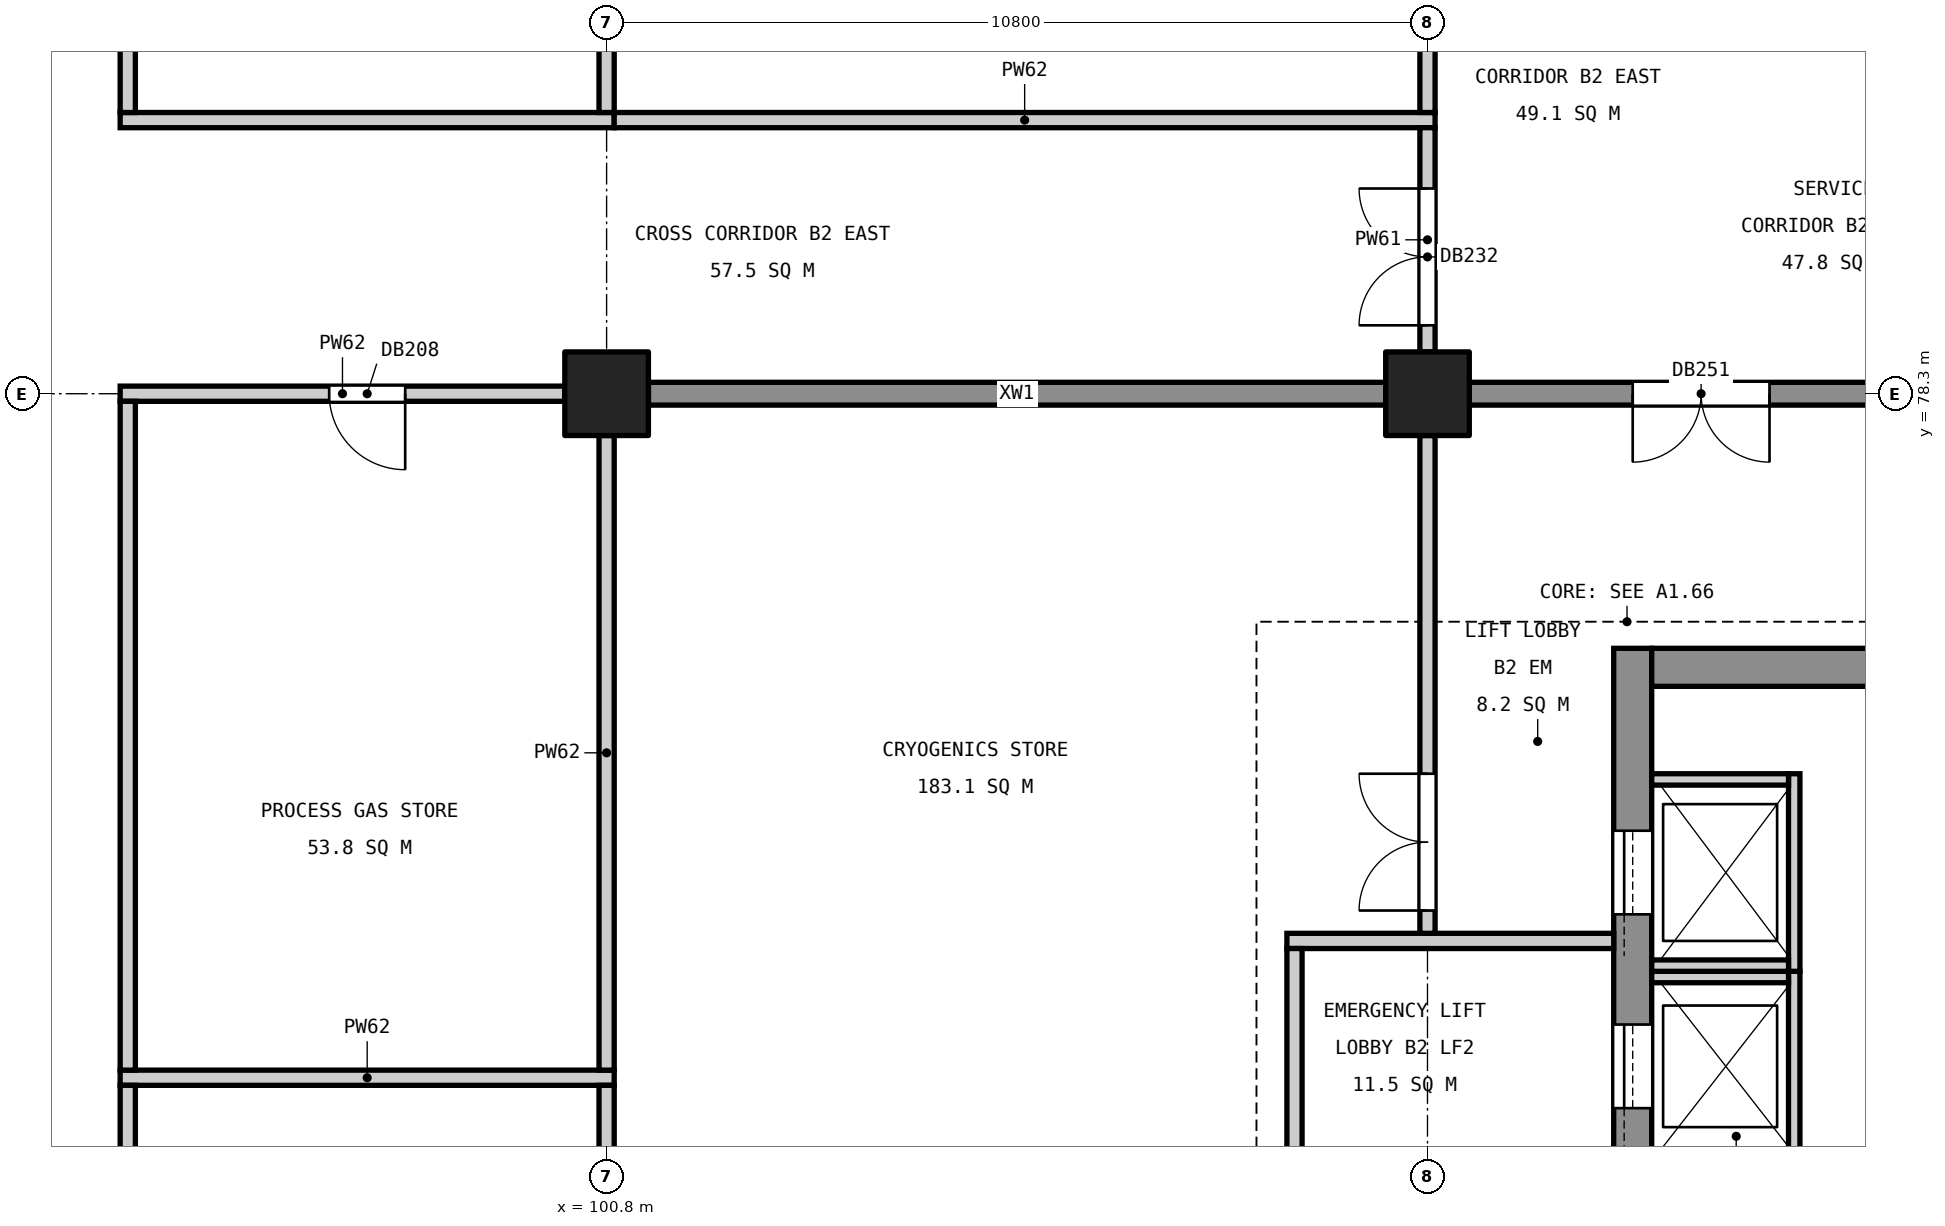
"""IFC4 building model, lengths in metres.
Left out: names, types, materials, properties, quantities, classifications, styles, units other than length and angle.
Written with IfcOpenShell. Run it as: python <this file> out.ifc"""

import sys

from ifc_helpers import new_model, si_unit, direction, frame, frame_2d, origin, origin_2d, place, context, subcontext, project, spatial, rectangle, extrude, element, fill, save


model = new_model("IFC4")
c1 = context("Model", 3, precision=1e-05, world=origin(), true_north=direction((0.0, 1.0)))
c2 = subcontext(c1, "Body", "Model", "MODEL_VIEW")
j1 = project(units=[si_unit("LENGTHUNIT", "METRE"), si_unit("PLANEANGLEUNIT", "RADIAN")], contexts=[c1])
p1 = place(None, origin())
s1 = spatial("IfcSite", under=j1, at=p1, CompositionType="ELEMENT")
p2 = place(p1, origin())
s2 = spatial("IfcBuilding", under=s1, at=p2, CompositionType="ELEMENT")
p3 = place(p2, frame((0.0, 0.0, -9.6)))
s3 = spatial("IfcBuildingStorey", under=s2, at=p3, CompositionType="ELEMENT", Elevation=-9.6)
for number, where, z_axis, x_axis in (
    (1, (111.6, 78.3, 0.0), (0.0, 0.0, 1.0), (1.0, 0.0, 0.0)),
    (2, (100.8, 78.3, 0.0), (0.0, 0.0, 1.0), (1.0, 0.0, 0.0)),
):
    element("IfcColumn", number, at=place(p3, frame(where, z_axis=z_axis, x_axis=x_axis)), inside=s3, PredefinedType="COLUMN", context=c2, shape_type="SweptSolid", body=[
        extrude(rectangle(XDim=1.1, YDim=1.1, at=origin_2d()), origin(), (0.0, 0.0, 1.0), 4.35),
    ])
p4 = place(p3, frame((114.3, 60.05, 0.0), z_axis=(0.0, 0.0, 1.0), x_axis=(0.0, 1.0, 0.0)))
e3 = element("IfcWall", 3, at=p4, inside=s3, PredefinedType="SHEAR", context=c2, shape_type="SweptSolid", body=[
    extrude(rectangle(XDim=14.9, YDim=0.5, at=frame_2d((7.45, 0.0))), origin(), (0.0, 0.0, 1.0), 4.35),
])
p5 = place(p4, frame((8.85, 0.0, 0.0)))
e4 = element("IfcOpeningElement", 4, at=p5, cuts=e3, PredefinedType="OPENING", context=c2, shape_type="SweptSolid", body=[
    extrude(rectangle(XDim=1.1, YDim=2.1, at=frame_2d((0.55, 1.05))), frame((0.0, 0.26, 0.0), z_axis=(0.0, -1.0, 0.0), x_axis=(1.0, 0.0, 0.0)), (0.0, 0.0, 1.0), 0.52),
])
p6 = place(p4, frame((11.4, 0.0, 0.0)))
e5 = element("IfcOpeningElement", 5, at=p6, cuts=e3, PredefinedType="OPENING", context=c2, shape_type="SweptSolid", body=[
    extrude(rectangle(XDim=1.1, YDim=2.1, at=frame_2d((0.55, 1.05))), frame((0.0, 0.26, 0.0), z_axis=(0.0, -1.0, 0.0), x_axis=(1.0, 0.0, 0.0)), (0.0, 0.0, 1.0), 0.52),
])
p7 = place(p4, frame((3.75, 0.0, 0.0)))
e6 = element("IfcOpeningElement", 6, at=p7, cuts=e3, PredefinedType="OPENING", context=c2, shape_type="SweptSolid", body=[
    extrude(rectangle(XDim=1.0, YDim=2.1, at=frame_2d((0.5, 1.05))), frame((0.0, 0.26, 0.0), z_axis=(0.0, -1.0, 0.0), x_axis=(1.0, 0.0, 0.0)), (0.0, 0.0, 1.0), 0.52),
])
p8 = place(p3, frame((118.55, 74.7, 0.0), z_axis=(0.0, 0.0, 1.0), x_axis=(-1.0, 0.0, 0.0)))
e7 = element("IfcWall", 7, at=p8, inside=s3, PredefinedType="SHEAR", context=c2, shape_type="SweptSolid", body=[
    extrude(rectangle(XDim=4.0, YDim=0.5, at=frame_2d((2.0, 0.0))), origin(), (0.0, 0.0, 1.0), 4.35),
])
p9 = place(p3, frame((118.25, 78.3, 0.0), z_axis=(0.0, 0.0, 1.0), x_axis=(-1.0, 0.0, 0.0)))
e8 = element("IfcWall", 8, at=p9, inside=s3, PredefinedType="SHEAR", context=c2, shape_type="SweptSolid", body=[
    extrude(rectangle(XDim=6.1, YDim=0.3, at=frame_2d((3.05, 0.0))), origin(), (0.0, 0.0, 1.0), 4.35),
])
p10 = place(p9, frame((2.15, 0.0, 0.0)))
e9 = element("IfcOpeningElement", 9, at=p10, cuts=e8, PredefinedType="OPENING", context=c2, shape_type="SweptSolid", body=[
    extrude(rectangle(XDim=1.8, YDim=2.1, at=frame_2d((0.9, 1.05))), frame((0.0, 0.16, 0.0), z_axis=(0.0, -1.0, 0.0), x_axis=(1.0, 0.0, 0.0)), (0.0, 0.0, 1.0), 0.32),
])
p11 = place(p3, frame((111.05, 78.3, 0.0), z_axis=(0.0, 0.0, 1.0), x_axis=(-1.0, 0.0, 0.0)))
e10 = element("IfcWall", 10, at=p11, inside=s3, PredefinedType="SHEAR", context=c2, shape_type="SweptSolid", body=[
    extrude(rectangle(XDim=9.7, YDim=0.3, at=frame_2d((4.85, 0.0))), origin(), (0.0, 0.0, 1.0), 4.35),
])
p12 = place(p3, frame((116.425, 68.2, 0.0), z_axis=(0.0, 0.0, 1.0), x_axis=(0.0, 1.0, 0.0)))
e11 = element("IfcWall", 11, at=p12, inside=s3, PredefinedType="SOLIDWALL", context=c2, shape_type="SweptSolid", body=[
    extrude(rectangle(XDim=2.5, YDim=0.15, at=frame_2d((1.25, 0.0))), origin(), (0.0, 0.0, 1.0), 4.8),
])
p13 = place(p3, frame((116.35, 70.625, 0.0), z_axis=(0.0, 0.0, 1.0), x_axis=(-1.0, 0.0, 0.0)))
e12 = element("IfcWall", 12, at=p13, inside=s3, PredefinedType="SOLIDWALL", context=c2, shape_type="SweptSolid", body=[
    extrude(rectangle(XDim=1.8, YDim=0.15, at=frame_2d((0.9, 0.0))), origin(), (0.0, 0.0, 1.0), 4.8),
])
p14 = place(p3, frame((116.425, 70.7, 0.0), z_axis=(0.0, 0.0, 1.0), x_axis=(0.0, 1.0, 0.0)))
e13 = element("IfcWall", 13, at=p14, inside=s3, PredefinedType="SOLIDWALL", context=c2, shape_type="SweptSolid", body=[
    extrude(rectangle(XDim=2.6, YDim=0.15, at=frame_2d((1.3, 0.0))), origin(), (0.0, 0.0, 1.0), 4.8),
])
for number, where, z_axis, x_axis in (
    (14, (116.35, 70.775, 0.0), (0.0, 0.0, 1.0), (-1.0, 0.0, 0.0)),
    (15, (116.35, 73.225, 0.0), (0.0, 0.0, 1.0), (-1.0, 0.0, 0.0)),
):
    element("IfcWall", number, at=place(p3, frame(where, z_axis=z_axis, x_axis=x_axis)), inside=s3, PredefinedType="SOLIDWALL", context=c2, shape_type="SweptSolid", body=[
        extrude(rectangle(XDim=1.8, YDim=0.15, at=frame_2d((0.9, 0.0))), origin(), (0.0, 0.0, 1.0), 4.8),
    ])
p15 = place(p3, frame((94.4, 69.3, 0.0), z_axis=(0.0, 0.0, 1.0), x_axis=(1.0, 0.0, 0.0)))
e16 = element("IfcWall", 16, at=p15, inside=s3, PredefinedType="PARTITIONING", context=c2, shape_type="SweptSolid", body=[
    extrude(rectangle(XDim=6.5, YDim=0.2, at=frame_2d((3.25, 0.0))), origin(), (0.0, 0.0, 1.0), 4.35),
])
p16 = place(p3, frame((109.75, 71.1, 0.0), z_axis=(0.0, 0.0, 1.0), x_axis=(1.0, 0.0, 0.0)))
e17 = element("IfcWall", 17, at=p16, inside=s3, PredefinedType="PARTITIONING", context=c2, shape_type="SweptSolid", body=[
    extrude(rectangle(XDim=4.3, YDim=0.2, at=frame_2d((2.15, 0.0))), origin(), (0.0, 0.0, 1.0), 4.35),
])
p17 = place(p3, frame((94.4, 78.3, 0.0), z_axis=(0.0, 0.0, 1.0), x_axis=(1.0, 0.0, 0.0)))
e18 = element("IfcWall", 18, at=p17, inside=s3, PredefinedType="PARTITIONING", context=c2, shape_type="SweptSolid", body=[
    extrude(rectangle(XDim=5.85, YDim=0.2, at=frame_2d((2.925, 0.0))), origin(), (0.0, 0.0, 1.0), 4.35),
])
p18 = place(p17, frame((2.75, 0.0, 0.0)))
e19 = element("IfcOpeningElement", 19, at=p18, cuts=e18, PredefinedType="OPENING", context=c2, shape_type="SweptSolid", body=[
    extrude(rectangle(XDim=1.0, YDim=2.1, at=frame_2d((0.5, 1.05))), frame((0.0, 0.11, 0.0), z_axis=(0.0, -1.0, 0.0), x_axis=(1.0, 0.0, 0.0)), (0.0, 0.0, 1.0), 0.22),
])
p19 = place(p3, frame((94.4, 81.9, 0.0), z_axis=(0.0, 0.0, 1.0), x_axis=(1.0, 0.0, 0.0)))
e20 = element("IfcWall", 20, at=p19, inside=s3, PredefinedType="PARTITIONING", context=c2, shape_type="SweptSolid", body=[
    extrude(rectangle(XDim=6.5, YDim=0.2, at=frame_2d((3.25, 0.0))), origin(), (0.0, 0.0, 1.0), 4.35),
])
p20 = place(p3, frame((100.9, 81.9, 0.0), z_axis=(0.0, 0.0, 1.0), x_axis=(1.0, 0.0, 0.0)))
e21 = element("IfcWall", 21, at=p20, inside=s3, PredefinedType="PARTITIONING", context=c2, shape_type="SweptSolid", body=[
    extrude(rectangle(XDim=10.8, YDim=0.2, at=frame_2d((5.4, 0.0))), origin(), (0.0, 0.0, 1.0), 4.35),
])
for number, where, z_axis, x_axis in (
    (22, (94.5, 60.4, 0.0), (0.0, 0.0, 1.0), (0.0, 1.0, 0.0)),
    (23, (94.5, 69.4, 0.0), (0.0, 0.0, 1.0), (0.0, 1.0, 0.0)),
):
    element("IfcWall", number, at=place(p3, frame(where, z_axis=z_axis, x_axis=x_axis)), inside=s3, PredefinedType="PARTITIONING", context=c2, shape_type="SweptSolid", body=[
        extrude(rectangle(XDim=8.8, YDim=0.2, at=frame_2d((4.4, 0.0))), origin(), (0.0, 0.0, 1.0), 4.35),
    ])
p21 = place(p3, frame((94.5, 82.0, 0.0), z_axis=(0.0, 0.0, 1.0), x_axis=(0.0, 1.0, 0.0)))
e24 = element("IfcWall", 24, at=p21, inside=s3, PredefinedType="PARTITIONING", context=c2, shape_type="SweptSolid", body=[
    extrude(rectangle(XDim=17.8, YDim=0.2, at=frame_2d((8.9, 0.0))), origin(), (0.0, 0.0, 1.0), 4.35),
])
p22 = place(p3, frame((100.8, 68.05, 0.0), z_axis=(0.0, 0.0, 1.0), x_axis=(0.0, 1.0, 0.0)))
e25 = element("IfcWall", 25, at=p22, inside=s3, PredefinedType="PARTITIONING", context=c2, shape_type="SweptSolid", body=[
    extrude(rectangle(XDim=1.15, YDim=0.2, at=frame_2d((0.575, 0.0))), origin(), (0.0, 0.0, 1.0), 4.35),
])
p23 = place(p3, frame((100.8, 69.4, 0.0), z_axis=(0.0, 0.0, 1.0), x_axis=(0.0, 1.0, 0.0)))
e26 = element("IfcWall", 26, at=p23, inside=s3, PredefinedType="PARTITIONING", context=c2, shape_type="SweptSolid", body=[
    extrude(rectangle(XDim=8.35, YDim=0.2, at=frame_2d((4.175, 0.0))), origin(), (0.0, 0.0, 1.0), 4.35),
])
p24 = place(p3, frame((100.8, 82.0, 0.0), z_axis=(0.0, 0.0, 1.0), x_axis=(0.0, 1.0, 0.0)))
e27 = element("IfcWall", 27, at=p24, inside=s3, PredefinedType="PARTITIONING", context=c2, shape_type="SweptSolid", body=[
    extrude(rectangle(XDim=6.55, YDim=0.2, at=frame_2d((3.275, 0.0))), origin(), (0.0, 0.0, 1.0), 4.35),
])
p25 = place(p3, frame((109.85, 68.225, 0.0), z_axis=(0.0, 0.0, 1.0), x_axis=(0.0, 1.0, 0.0)))
e28 = element("IfcWall", 28, at=p25, inside=s3, PredefinedType="PARTITIONING", context=c2, shape_type="SweptSolid", body=[
    extrude(rectangle(XDim=2.775, YDim=0.2, at=frame_2d((1.387, 0.0))), origin(), (0.0, 0.0, 1.0), 4.35),
])
p26 = place(p3, frame((111.6, 71.2, 0.0), z_axis=(0.0, 0.0, 1.0), x_axis=(0.0, 1.0, 0.0)))
e29 = element("IfcWall", 29, at=p26, inside=s3, PredefinedType="PARTITIONING", context=c2, shape_type="SweptSolid", body=[
    extrude(rectangle(XDim=6.55, YDim=0.2, at=frame_2d((3.275, 0.0))), origin(), (0.0, 0.0, 1.0), 4.35),
])
p27 = place(p26, frame((0.3, 0.0, 0.0)))
e30 = element("IfcOpeningElement", 30, at=p27, cuts=e29, PredefinedType="OPENING", context=c2, shape_type="SweptSolid", body=[
    extrude(rectangle(XDim=1.8, YDim=2.1, at=frame_2d((0.9, 1.05))), frame((0.0, 0.11, 0.0), z_axis=(0.0, -1.0, 0.0), x_axis=(1.0, 0.0, 0.0)), (0.0, 0.0, 1.0), 0.22),
])
p28 = place(p3, frame((111.6, 78.85, 0.0), z_axis=(0.0, 0.0, 1.0), x_axis=(0.0, 1.0, 0.0)))
e31 = element("IfcWall", 31, at=p28, inside=s3, PredefinedType="PARTITIONING", context=c2, shape_type="SweptSolid", body=[
    extrude(rectangle(XDim=2.95, YDim=0.2, at=frame_2d((1.475, 0.0))), origin(), (0.0, 0.0, 1.0), 4.35),
])
p29 = place(p28, frame((0.35, 0.0, 0.0)))
e32 = element("IfcOpeningElement", 32, at=p29, cuts=e31, PredefinedType="OPENING", context=c2, shape_type="SweptSolid", body=[
    extrude(rectangle(XDim=1.8, YDim=2.1, at=frame_2d((0.9, 1.05))), frame((0.0, 0.11, 0.0), z_axis=(0.0, -1.0, 0.0), x_axis=(1.0, 0.0, 0.0)), (0.0, 0.0, 1.0), 0.22),
])
p30 = place(p3, frame((111.6, 82.0, 0.0), z_axis=(0.0, 0.0, 1.0), x_axis=(0.0, 1.0, 0.0)))
e33 = element("IfcWall", 33, at=p30, inside=s3, PredefinedType="PARTITIONING", context=c2, shape_type="SweptSolid", body=[
    extrude(rectangle(XDim=6.55, YDim=0.2, at=frame_2d((3.275, 0.0))), origin(), (0.0, 0.0, 1.0), 4.35),
])
p31 = place(p5, origin())
e34 = element("IfcDoor", 34, at=p31, inside=s3, OperationType="SLIDING_TO_LEFT", PredefinedType="DOOR", context=c2, shape_type="SweptSolid", body=[
    extrude(rectangle(XDim=1.1, YDim=2.1, at=frame_2d((0.55, 1.05))), frame((0.0, 0.025, 0.0), z_axis=(0.0, -1.0, 0.0), x_axis=(1.0, 0.0, 0.0)), (0.0, 0.0, 1.0), 0.05),
])
fill(e4, e34)
p32 = place(p6, origin())
e35 = element("IfcDoor", 35, at=p32, inside=s3, OperationType="SLIDING_TO_LEFT", PredefinedType="DOOR", context=c2, shape_type="SweptSolid", body=[
    extrude(rectangle(XDim=1.1, YDim=2.1, at=frame_2d((0.55, 1.05))), frame((0.0, 0.025, 0.0), z_axis=(0.0, -1.0, 0.0), x_axis=(1.0, 0.0, 0.0)), (0.0, 0.0, 1.0), 0.05),
])
fill(e5, e35)
p33 = place(p18, frame((1.0, 0.0, 0.0), z_axis=(0.0, 0.0, 1.0), x_axis=(-1.0, 0.0, 0.0)))
e36 = element("IfcDoor", 36, at=p33, inside=s3, OperationType="SINGLE_SWING_LEFT", PredefinedType="DOOR", context=c2, shape_type="SweptSolid", body=[
    extrude(rectangle(XDim=1.0, YDim=2.1, at=frame_2d((0.5, 1.05))), frame((0.0, 0.025, 0.0), z_axis=(0.0, -1.0, 0.0), x_axis=(1.0, 0.0, 0.0)), (0.0, 0.0, 1.0), 0.05),
])
fill(e19, e36)
p34 = place(p27, origin())
e37 = element("IfcDoor", 37, at=p34, inside=s3, OperationType="DOUBLE_DOOR_SINGLE_SWING", PredefinedType="DOOR", context=c2, shape_type="SweptSolid", body=[
    extrude(rectangle(XDim=1.8, YDim=2.1, at=frame_2d((0.9, 1.05))), frame((0.0, 0.025, 0.0), z_axis=(0.0, -1.0, 0.0), x_axis=(1.0, 0.0, 0.0)), (0.0, 0.0, 1.0), 0.05),
])
fill(e30, e37)
p35 = place(p29, origin())
e38 = element("IfcDoor", 38, at=p35, inside=s3, OperationType="DOUBLE_DOOR_SINGLE_SWING", PredefinedType="DOOR", context=c2, shape_type="SweptSolid", body=[
    extrude(rectangle(XDim=1.8, YDim=2.1, at=frame_2d((0.9, 1.05))), frame((0.0, 0.025, 0.0), z_axis=(0.0, -1.0, 0.0), x_axis=(1.0, 0.0, 0.0)), (0.0, 0.0, 1.0), 0.05),
])
fill(e32, e38)
p36 = place(p10, origin())
e39 = element("IfcDoor", 39, at=p36, inside=s3, OperationType="DOUBLE_DOOR_SINGLE_SWING", PredefinedType="DOOR", context=c2, shape_type="SweptSolid", body=[
    extrude(rectangle(XDim=1.8, YDim=2.1, at=frame_2d((0.9, 1.05))), frame((0.0, 0.025, 0.0), z_axis=(0.0, -1.0, 0.0), x_axis=(1.0, 0.0, 0.0)), (0.0, 0.0, 1.0), 0.05),
])
fill(e9, e39)
save(model, sys.argv[1])
